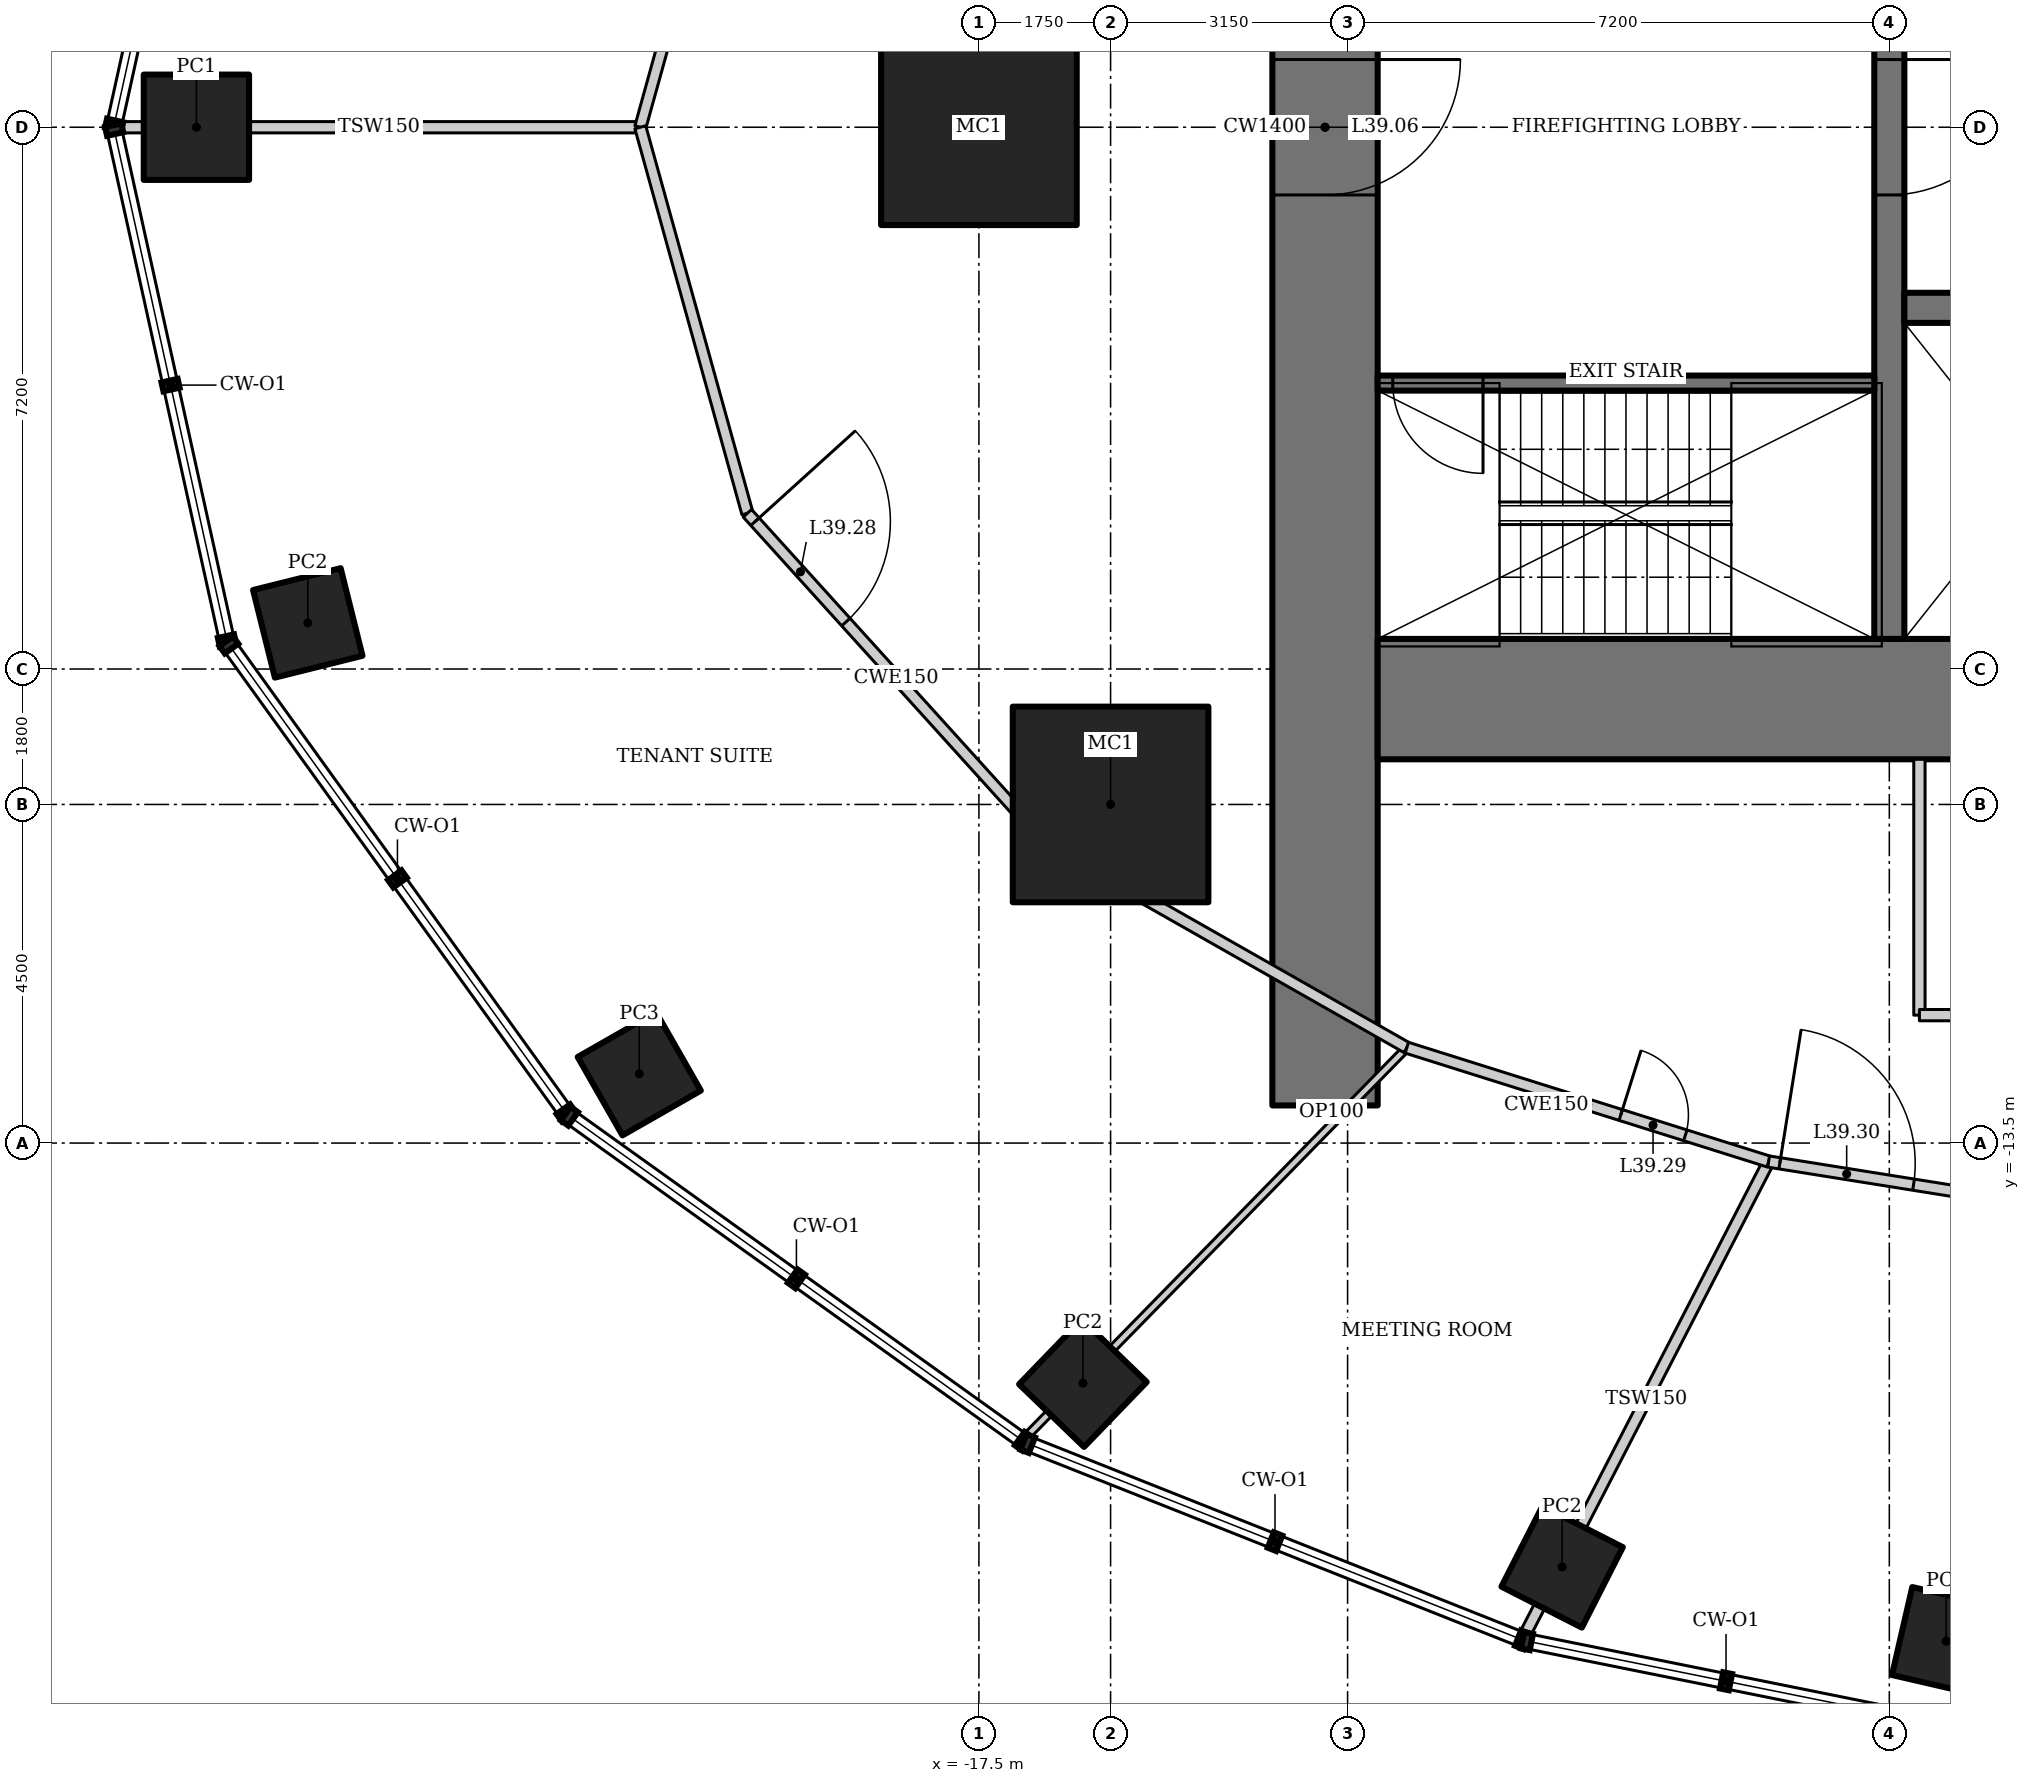
"""IFC4 building model, lengths in metres.
Left out: names, types, materials, properties, quantities, classifications, styles, units other than length and angle.
Written with IfcOpenShell. Run it as: python <this file> out.ifc"""

import sys

from ifc_helpers import new_model, si_unit, direction, frame, frame_2d, origin, origin_2d, place, context, subcontext, project, spatial, rectangle, hollow_rectangle, extrude, element, fill, save


model = new_model("IFC4")
c1 = context("Model", 3, precision=1e-05, world=origin(), true_north=direction((0.0, 1.0)))
c2 = subcontext(c1, "Body", "Model", "MODEL_VIEW")
j1 = project(units=[si_unit("LENGTHUNIT", "METRE"), si_unit("PLANEANGLEUNIT", "RADIAN")], contexts=[c1])
p1 = place(None, origin())
s1 = spatial("IfcSite", under=j1, at=p1, CompositionType="ELEMENT")
p2 = place(p1, origin())
s2 = spatial("IfcBuilding", under=s1, at=p2, CompositionType="ELEMENT")
p3 = place(p2, frame((0.0, 0.0, 167.8)))
s3 = spatial("IfcBuildingStorey", under=s2, at=p3, CompositionType="ELEMENT", Elevation=167.8)
for number, where, z_axis, x_axis in (
    (1, (-17.5, 0.0, 0.0), (0.0, 0.0, 1.0), (1.0, 0.0, 0.0)),
    (2, (-15.75, -9.0, 0.0), (0.0, 0.0, 1.0), (1.0, 0.0, 0.0)),
):
    element("IfcColumn", number, at=place(p3, frame(where, z_axis=z_axis, x_axis=x_axis)), inside=s3, PredefinedType="COLUMN", context=c2, shape_type="SweptSolid", body=[
        extrude(hollow_rectangle(XDim=2.6, YDim=2.6, WallThickness=0.13, at=origin_2d()), origin(), (0.0, 0.0, 1.0), 4.2),
    ])
p4 = place(p3, frame((-27.9, 0.0, 0.0), z_axis=(0.0, 0.0, 1.0), x_axis=(1.0, 0.0, 0.0)))
e3 = element("IfcColumn", 3, at=p4, inside=s3, PredefinedType="COLUMN", context=c2, shape_type="SweptSolid", body=[
    extrude(hollow_rectangle(XDim=1.4, YDim=1.4, WallThickness=0.1, at=origin_2d()), origin(), (0.0, 0.0, 1.0), 4.2),
])
p5 = place(p3, frame((-26.42, -6.587, 0.0), z_axis=(0.0, 0.0, 1.0), x_axis=(0.970295726276, 0.2419218956, 0.0)))
e4 = element("IfcColumn", 4, at=p5, inside=s3, PredefinedType="COLUMN", context=c2, shape_type="SweptSolid", body=[
    extrude(hollow_rectangle(XDim=1.2, YDim=1.2, WallThickness=0.1, at=origin_2d()), origin(), (0.0, 0.0, 1.0), 4.2),
])
p6 = place(p3, frame((-22.014, -12.579, 0.0), z_axis=(0.0, 0.0, 1.0), x_axis=(0.86824298017, 0.496139221777, 0.0)))
e5 = element("IfcColumn", 5, at=p6, inside=s3, PredefinedType="COLUMN", context=c2, shape_type="SweptSolid", body=[
    extrude(hollow_rectangle(XDim=1.2, YDim=1.2, WallThickness=0.12, at=origin_2d()), origin(), (0.0, 0.0, 1.0), 4.2),
])
for number, where, z_axis, x_axis in (
    (6, (-16.118, -16.69, 0.0), (0.0, 0.0, 1.0), (0.695, 0.719, 0.0)),
    (7, (-9.749, -19.133, 0.0), (0.0, 0.0, 1.0), (0.454, 0.891, 0.0)),
    (8, (-4.645, -20.12, 0.0), (0.0, 0.0, 1.0), (0.225, 0.974, 0.0)),
):
    element("IfcColumn", number, at=place(p3, frame(where, z_axis=z_axis, x_axis=x_axis)), inside=s3, PredefinedType="COLUMN", context=c2, shape_type="SweptSolid", body=[
        extrude(hollow_rectangle(XDim=1.2, YDim=1.2, WallThickness=0.1, at=origin_2d()), origin(), (0.0, 0.0, 1.0), 4.2),
    ])
p7 = place(p3, frame((-12.9, 13.0, 0.0), z_axis=(0.0, 0.0, 1.0), x_axis=(0.0, -1.0, 0.0)))
e9 = element("IfcWall", 9, at=p7, inside=s3, PredefinedType="SHEAR", context=c2, shape_type="SweptSolid", body=[
    extrude(rectangle(XDim=26.0, YDim=1.4, at=frame_2d((13.0, 0.0))), origin(), (0.0, 0.0, 1.0), 4.2),
])
p8 = place(p7, frame((12.1, 0.0, 0.0)))
e10 = element("IfcOpeningElement", 10, at=p8, cuts=e9, PredefinedType="OPENING", context=c2, shape_type="SweptSolid", body=[
    extrude(rectangle(XDim=1.8, YDim=2.1, at=frame_2d((0.9, 1.05))), frame((0.0, 0.71, 0.0), z_axis=(0.0, -1.0, 0.0), x_axis=(1.0, 0.0, 0.0)), (0.0, 0.0, 1.0), 1.42),
])
p9 = place(p3, frame((-12.2, -7.6, 0.0), z_axis=(0.0, 0.0, 1.0), x_axis=(1.0, 0.0, 0.0)))
e11 = element("IfcWall", 11, at=p9, inside=s3, PredefinedType="SHEAR", context=c2, shape_type="SweptSolid", body=[
    extrude(rectangle(XDim=24.4, YDim=1.6, at=frame_2d((12.2, 0.0))), origin(), (0.0, 0.0, 1.0), 4.2),
])
p10 = place(p3, frame((-5.4, 6.8, 0.0), z_axis=(0.0, 0.0, 1.0), x_axis=(0.0, -1.0, 0.0)))
e12 = element("IfcWall", 12, at=p10, inside=s3, PredefinedType="SHEAR", context=c2, shape_type="SweptSolid", body=[
    extrude(rectangle(XDim=13.6, YDim=0.4, at=frame_2d((6.8, 0.0))), origin(), (0.0, 0.0, 1.0), 4.2),
])
p11 = place(p10, frame((5.9, 0.0, 0.0)))
e13 = element("IfcOpeningElement", 13, at=p11, cuts=e12, PredefinedType="OPENING", context=c2, shape_type="SweptSolid", body=[
    extrude(rectangle(XDim=1.8, YDim=2.1, at=frame_2d((0.9, 1.05))), frame((0.0, 0.21, 0.0), z_axis=(0.0, -1.0, 0.0), x_axis=(1.0, 0.0, 0.0)), (0.0, 0.0, 1.0), 0.42),
])
p12 = place(p3, frame((-5.2, -2.4, 0.0), z_axis=(0.0, 0.0, 1.0), x_axis=(1.0, 0.0, 0.0)))
e14 = element("IfcWall", 14, at=p12, inside=s3, PredefinedType="SHEAR", context=c2, shape_type="SweptSolid", body=[
    extrude(rectangle(XDim=10.4, YDim=0.4, at=frame_2d((5.2, 0.0))), origin(), (0.0, 0.0, 1.0), 4.2),
])
p13 = place(p3, frame((-5.6, -3.4, 0.0), z_axis=(0.0, 0.0, 1.0), x_axis=(-1.0, 0.0, 0.0)))
e15 = element("IfcWall", 15, at=p13, inside=s3, PredefinedType="SHEAR", context=c2, shape_type="SweptSolid", body=[
    extrude(rectangle(XDim=6.6, YDim=0.2, at=frame_2d((3.3, 0.0))), origin(), (0.0, 0.0, 1.0), 4.2),
])
p14 = place(p13, frame((5.2, 0.0, 0.0)))
e16 = element("IfcOpeningElement", 16, at=p14, cuts=e15, PredefinedType="OPENING", context=c2, shape_type="SweptSolid", body=[
    extrude(rectangle(XDim=1.2, YDim=2.1, at=frame_2d((0.6, 1.05))), frame((0.0, 0.11, 0.0), z_axis=(0.0, -1.0, 0.0), x_axis=(1.0, 0.0, 0.0)), (0.0, 0.0, 1.0), 0.22),
])
p15 = place(p3, frame((-28.944, 0.0, 0.0), z_axis=(0.0, 0.0, 1.0), x_axis=(1.0, 0.0, 0.0)))
e17 = element("IfcWall", 17, at=p15, inside=s3, PredefinedType="PARTITIONING", context=c2, shape_type="SweptSolid", body=[
    extrude(rectangle(XDim=6.944, YDim=0.15, at=frame_2d((3.472, 0.0))), origin(), (0.0, 0.0, 1.0), 3.204),
])
p16 = place(p3, frame((-16.882, -17.414, 0.0), z_axis=(0.0, 0.0, 1.0), x_axis=(0.699352142517, 0.714777294517, 0.0)))
e18 = element("IfcWall", 18, at=p16, inside=s3, PredefinedType="PARTITIONING", context=c2, shape_type="SweptSolid", body=[
    extrude(rectangle(XDim=7.249, YDim=0.1, at=frame_2d((3.625, 0.0))), origin(), (0.0, 0.0, 1.0), 3.321),
])
p17 = place(p3, frame((-10.253, -20.052, 0.0), z_axis=(0.0, 0.0, 1.0), x_axis=(0.458082677592, 0.888909590729, 0.0)))
e19 = element("IfcWall", 19, at=p17, inside=s3, PredefinedType="PARTITIONING", context=c2, shape_type="SweptSolid", body=[
    extrude(rectangle(XDim=7.094, YDim=0.15, at=frame_2d((3.547, 0.0))), origin(), (0.0, 0.0, 1.0), 3.349),
])
p18 = place(p3, frame((-20.577, 5.13, 0.0), z_axis=(0.0, 0.0, 1.0), x_axis=(-0.267293817428, -0.963615076244, 0.0)))
e20 = element("IfcWall", 20, at=p18, inside=s3, PredefinedType="PARTITIONING", context=c2, shape_type="SweptSolid", body=[
    extrude(rectangle(XDim=5.324, YDim=0.15, at=frame_2d((2.662, 0.0))), origin(), (0.0, 0.0, 1.0), 4.05),
])
p19 = place(p18, frame((0.15, 0.0, 0.0)))
e21 = element("IfcOpeningElement", 21, at=p19, cuts=e20, PredefinedType="OPENING", context=c2, shape_type="SweptSolid", body=[
    extrude(rectangle(XDim=0.9, YDim=2.1, at=frame_2d((0.45, 1.05))), frame((0.0, 0.085, 0.0), z_axis=(0.0, -1.0, 0.0), x_axis=(1.0, 0.0, 0.0)), (0.0, 0.0, 1.0), 0.17),
])
p20 = place(p3, frame((-22.0, 0.0, 0.0), z_axis=(0.0, 0.0, 1.0), x_axis=(0.267293817428, -0.963615076244, 0.0)))
e22 = element("IfcWall", 22, at=p20, inside=s3, PredefinedType="PARTITIONING", context=c2, shape_type="SweptSolid", body=[
    extrude(rectangle(XDim=5.324, YDim=0.15, at=frame_2d((2.662, 0.0))), origin(), (0.0, 0.0, 1.0), 4.05),
])
p21 = place(p3, frame((-20.577, -5.13, 0.0), z_axis=(0.0, 0.0, 1.0), x_axis=(0.671118353743, -0.741350224435, 0.0)))
e23 = element("IfcWall", 23, at=p21, inside=s3, PredefinedType="PARTITIONING", context=c2, shape_type="SweptSolid", body=[
    extrude(rectangle(XDim=5.892, YDim=0.15, at=frame_2d((2.946, 0.0))), origin(), (0.0, 0.0, 1.0), 4.05),
])
p22 = place(p21, frame((0.15, 0.0, 0.0)))
e24 = element("IfcOpeningElement", 24, at=p22, cuts=e23, PredefinedType="OPENING", context=c2, shape_type="SweptSolid", body=[
    extrude(rectangle(XDim=1.8, YDim=2.1, at=frame_2d((0.9, 1.05))), frame((0.0, 0.085, 0.0), z_axis=(0.0, -1.0, 0.0), x_axis=(1.0, 0.0, 0.0)), (0.0, 0.0, 1.0), 0.17),
])
p23 = place(p3, frame((-16.623, -9.499, 0.0), z_axis=(0.0, 0.0, 1.0), x_axis=(0.869375991036, -0.494151177485, 0.0)))
e25 = element("IfcWall", 25, at=p23, inside=s3, PredefinedType="PARTITIONING", context=c2, shape_type="SweptSolid", body=[
    extrude(rectangle(XDim=5.532, YDim=0.15, at=frame_2d((2.766, 0.0))), origin(), (0.0, 0.0, 1.0), 4.05),
])
p24 = place(p3, frame((-11.813, -12.232, 0.0), z_axis=(0.0, 0.0, 1.0), x_axis=(0.953893934057, -0.300143903101, 0.0)))
e26 = element("IfcWall", 26, at=p24, inside=s3, PredefinedType="PARTITIONING", context=c2, shape_type="SweptSolid", body=[
    extrude(rectangle(XDim=5.042, YDim=0.15, at=frame_2d((2.521, 0.0))), origin(), (0.0, 0.0, 1.0), 4.05),
])
p25 = place(p24, frame((2.98, 0.0, 0.0)))
e27 = element("IfcOpeningElement", 27, at=p25, cuts=e26, PredefinedType="OPENING", context=c2, shape_type="SweptSolid", body=[
    extrude(rectangle(XDim=0.9, YDim=2.1, at=frame_2d((0.45, 1.05))), frame((0.0, 0.085, 0.0), z_axis=(0.0, -1.0, 0.0), x_axis=(1.0, 0.0, 0.0)), (0.0, 0.0, 1.0), 0.17),
])
p26 = place(p3, frame((-7.004, -13.746, 0.0), z_axis=(0.0, 0.0, 1.0), x_axis=(0.987511396594, -0.157547585181, 0.0)))
e28 = element("IfcWall", 28, at=p26, inside=s3, PredefinedType="PARTITIONING", context=c2, shape_type="SweptSolid", body=[
    extrude(rectangle(XDim=3.741, YDim=0.15, at=frame_2d((1.87, 0.0))), origin(), (0.0, 0.0, 1.0), 4.05),
])
p27 = place(p26, frame((0.15, 0.0, 0.0)))
e29 = element("IfcOpeningElement", 29, at=p27, cuts=e28, PredefinedType="OPENING", context=c2, shape_type="SweptSolid", body=[
    extrude(rectangle(XDim=1.8, YDim=2.1, at=frame_2d((0.9, 1.05))), frame((0.0, 0.085, 0.0), z_axis=(0.0, -1.0, 0.0), x_axis=(1.0, 0.0, 0.0)), (0.0, 0.0, 1.0), 0.17),
])
p28 = place(p3, frame((-5.0, -8.4, 0.0), z_axis=(0.0, 0.0, 1.0), x_axis=(0.0, -1.0, 0.0)))
e30 = element("IfcWall", 30, at=p28, inside=s3, PredefinedType="SOLIDWALL", context=c2, shape_type="SweptSolid", body=[
    extrude(rectangle(XDim=3.4, YDim=0.15, at=frame_2d((1.7, 0.0))), origin(), (0.0, 0.0, 1.0), 4.05),
])
p29 = place(p3, frame((-12.9, -13.0, 0.0), z_axis=(0.0, 0.0, 1.0), x_axis=(0.714690391061, -0.699440951707, 0.0)))
e31 = element("IfcWall", 31, at=p29, inside=s3, PredefinedType="PARTITIONING", context=c2, shape_type="SweptSolid", body=[
    extrude(rectangle(XDim=0.24, YDim=0.1, at=frame_2d((0.12, 0.0))), origin(), (0.0, 0.0, 1.0), 4.05),
])
p30 = place(p3, frame((-5.0, -11.8, 0.0), z_axis=(0.0, 0.0, 1.0), x_axis=(1.0, 0.0, 0.0)))
e32 = element("IfcWall", 32, at=p30, inside=s3, PredefinedType="SOLIDWALL", context=c2, shape_type="SweptSolid", body=[
    extrude(rectangle(XDim=2.869, YDim=0.15, at=frame_2d((1.434, 0.0))), origin(), (0.0, 0.0, 1.0), 4.05),
])
p31 = place(p30, frame((1.25, 0.0, 0.0)))
e33 = element("IfcOpeningElement", 33, at=p31, cuts=e32, PredefinedType="OPENING", context=c2, shape_type="SweptSolid", body=[
    extrude(rectangle(XDim=0.9, YDim=2.1, at=frame_2d((0.45, 1.05))), frame((0.0, 0.085, 0.0), z_axis=(0.0, -1.0, 0.0), x_axis=(1.0, 0.0, 0.0)), (0.0, 0.0, 1.0), 0.17),
])
p32 = place(p11, origin())
e34 = element("IfcDoor", 34, at=p32, inside=s3, OperationType="DOUBLE_DOOR_DOUBLE_SWING", PredefinedType="DOOR", context=c2, shape_type="SweptSolid", body=[
    extrude(rectangle(XDim=1.8, YDim=2.1, at=frame_2d((0.9, 1.05))), frame((0.0, 0.025, 0.0), z_axis=(0.0, -1.0, 0.0), x_axis=(1.0, 0.0, 0.0)), (0.0, 0.0, 1.0), 0.05),
])
fill(e13, e34)
p33 = place(p14, origin())
e35 = element("IfcDoor", 35, at=p33, inside=s3, OperationType="SINGLE_SWING_RIGHT", PredefinedType="DOOR", context=c2, shape_type="SweptSolid", body=[
    extrude(rectangle(XDim=1.2, YDim=2.1, at=frame_2d((0.6, 1.05))), frame((0.0, 0.025, 0.0), z_axis=(0.0, -1.0, 0.0), x_axis=(1.0, 0.0, 0.0)), (0.0, 0.0, 1.0), 0.05),
])
fill(e16, e35)
p34 = place(p8, origin())
e36 = element("IfcDoor", 36, at=p34, inside=s3, OperationType="DOUBLE_DOOR_DOUBLE_SWING", PredefinedType="DOOR", context=c2, shape_type="SweptSolid", body=[
    extrude(rectangle(XDim=1.8, YDim=2.1, at=frame_2d((0.9, 1.05))), frame((0.0, 0.025, 0.0), z_axis=(0.0, -1.0, 0.0), x_axis=(1.0, 0.0, 0.0)), (0.0, 0.0, 1.0), 0.05),
])
fill(e10, e36)
p35 = place(p22, origin())
e37 = element("IfcDoor", 37, at=p35, inside=s3, OperationType="DOUBLE_DOOR_DOUBLE_SWING", PredefinedType="DOOR", context=c2, shape_type="SweptSolid", body=[
    extrude(rectangle(XDim=1.8, YDim=2.1, at=frame_2d((0.9, 1.05))), frame((0.0, 0.025, 0.0), z_axis=(0.0, -1.0, 0.0), x_axis=(1.0, 0.0, 0.0)), (0.0, 0.0, 1.0), 0.05),
])
fill(e24, e37)
p36 = place(p25, origin())
e38 = element("IfcDoor", 38, at=p36, inside=s3, OperationType="SINGLE_SWING_LEFT", PredefinedType="DOOR", context=c2, shape_type="SweptSolid", body=[
    extrude(rectangle(XDim=0.9, YDim=2.1, at=frame_2d((0.45, 1.05))), frame((0.0, 0.025, 0.0), z_axis=(0.0, -1.0, 0.0), x_axis=(1.0, 0.0, 0.0)), (0.0, 0.0, 1.0), 0.05),
])
fill(e27, e38)
p37 = place(p27, origin())
e39 = element("IfcDoor", 39, at=p37, inside=s3, OperationType="DOUBLE_DOOR_DOUBLE_SWING", PredefinedType="DOOR", context=c2, shape_type="SweptSolid", body=[
    extrude(rectangle(XDim=1.8, YDim=2.1, at=frame_2d((0.9, 1.05))), frame((0.0, 0.025, 0.0), z_axis=(0.0, -1.0, 0.0), x_axis=(1.0, 0.0, 0.0)), (0.0, 0.0, 1.0), 0.05),
])
fill(e29, e39)
save(model, sys.argv[1])
